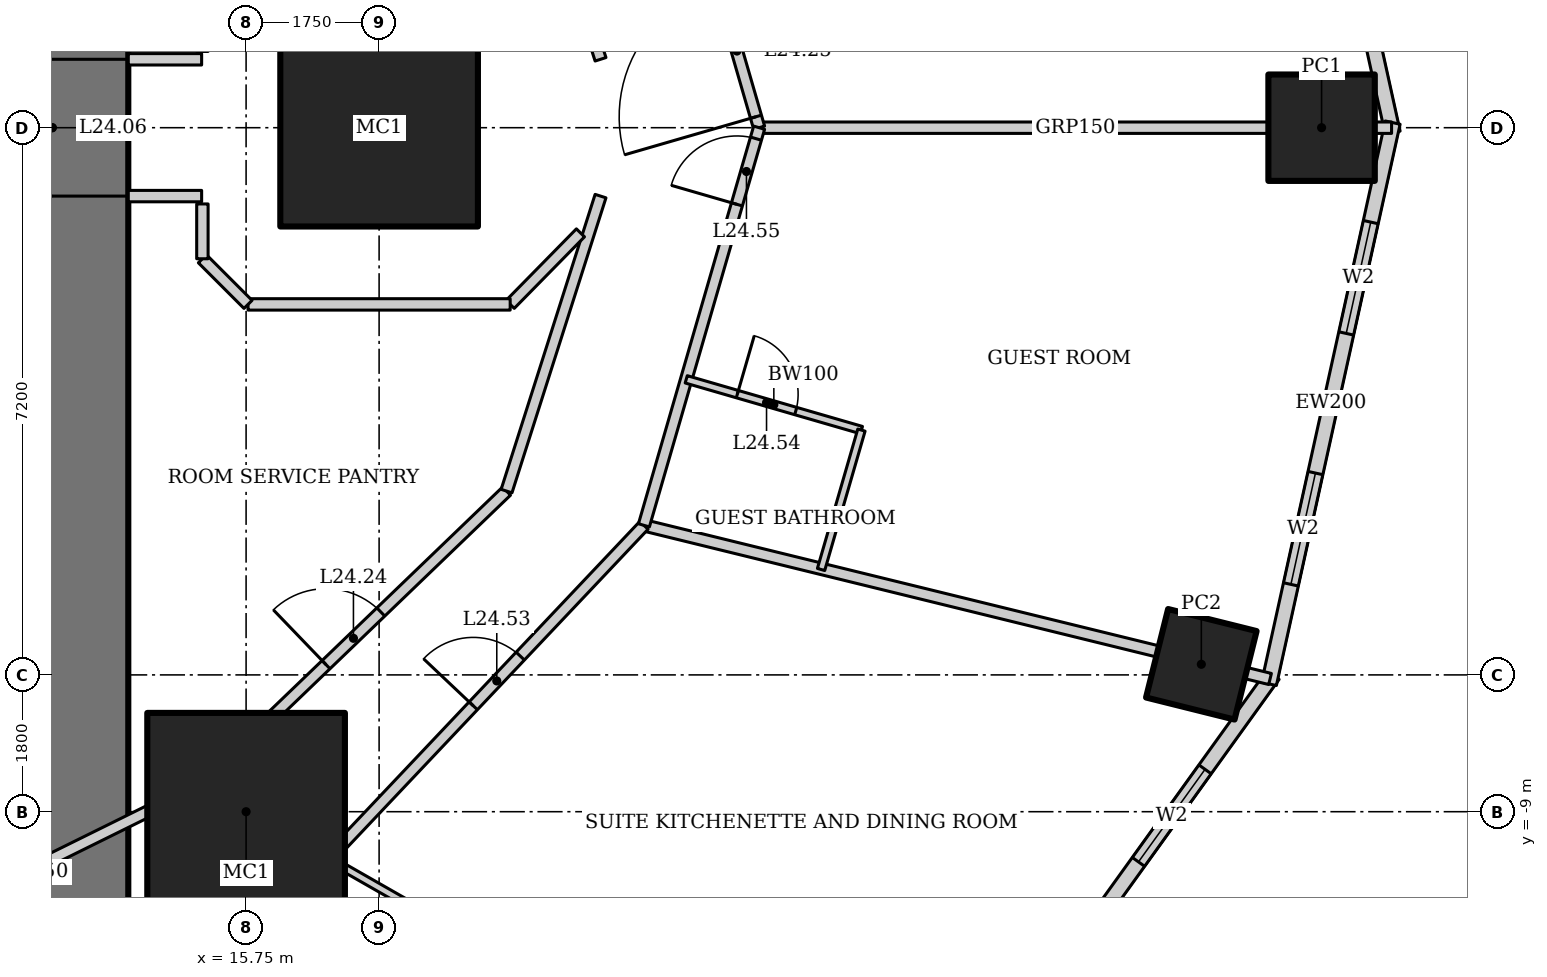
"""IFC4 building model, lengths in metres.
Left out: names, types, materials, properties, quantities, classifications, styles, units other than length and angle.
Written with IfcOpenShell. Run it as: python <this file> out.ifc"""

import sys

from ifc_helpers import new_model, si_unit, direction, frame, frame_2d, origin, origin_2d, place, context, subcontext, project, spatial, rectangle, hollow_rectangle, extrude, element, fill, save


model = new_model("IFC4")
c1 = context("Model", 3, precision=1e-05, world=origin(), true_north=direction((0.0, 1.0)))
c2 = subcontext(c1, "Body", "Model", "MODEL_VIEW")
j1 = project(units=[si_unit("LENGTHUNIT", "METRE"), si_unit("PLANEANGLEUNIT", "RADIAN")], contexts=[c1])
p1 = place(None, origin())
s1 = spatial("IfcSite", under=j1, at=p1, CompositionType="ELEMENT")
p2 = place(p1, origin())
s2 = spatial("IfcBuilding", under=s1, at=p2, CompositionType="ELEMENT")
p3 = place(p2, frame((0.0, 0.0, 101.8)))
s3 = spatial("IfcBuildingStorey", under=s2, at=p3, CompositionType="ELEMENT", Elevation=101.8)
for number, where, z_axis, x_axis in (
    (1, (17.5, 0.0, 0.0), (0.0, 0.0, 1.0), (1.0, 0.0, 0.0)),
    (2, (15.75, -9.0, 0.0), (0.0, 0.0, 1.0), (1.0, 0.0, 0.0)),
):
    element("IfcColumn", number, at=place(p3, frame(where, z_axis=z_axis, x_axis=x_axis)), inside=s3, PredefinedType="COLUMN", context=c2, shape_type="SweptSolid", body=[
        extrude(hollow_rectangle(XDim=2.6, YDim=2.6, WallThickness=0.13, at=origin_2d()), origin(), (0.0, 0.0, 1.0), 3.6),
    ])
p4 = place(p3, frame((29.9, 0.0, 0.0), z_axis=(0.0, 0.0, 1.0), x_axis=(1.0, 0.0, 0.0)))
e3 = element("IfcColumn", 3, at=p4, inside=s3, PredefinedType="COLUMN", context=c2, shape_type="SweptSolid", body=[
    extrude(hollow_rectangle(XDim=1.4, YDim=1.4, WallThickness=0.1, at=origin_2d()), origin(), (0.0, 0.0, 1.0), 2.06),
])
p5 = place(p3, frame((28.318, -7.06, 0.0), z_axis=(0.0, 0.0, 1.0), x_axis=(0.2419218956, 0.970295726276, 0.0)))
e4 = element("IfcColumn", 4, at=p5, inside=s3, PredefinedType="COLUMN", context=c2, shape_type="SweptSolid", body=[
    extrude(hollow_rectangle(XDim=1.2, YDim=1.2, WallThickness=0.1, at=origin_2d()), origin(), (0.0, 0.0, 1.0), 2.28),
])
p6 = place(p3, frame((13.2, -13.0, 0.0), z_axis=(0.0, 0.0, 1.0), x_axis=(0.0, 1.0, 0.0)))
e5 = element("IfcWall", 5, at=p6, inside=s3, PredefinedType="SHEAR", context=c2, shape_type="SweptSolid", body=[
    extrude(rectangle(XDim=26.0, YDim=2.0, at=frame_2d((13.0, 0.0))), origin(), (0.0, 0.0, 1.0), 3.6),
])
p7 = place(p6, frame((12.1, 0.0, 0.0)))
e6 = element("IfcOpeningElement", 6, at=p7, cuts=e5, PredefinedType="OPENING", context=c2, shape_type="SweptSolid", body=[
    extrude(rectangle(XDim=1.8, YDim=2.1, at=frame_2d((0.9, 1.05))), frame((0.0, 1.01, 0.0), z_axis=(0.0, -1.0, 0.0), x_axis=(1.0, 0.0, 0.0)), (0.0, 0.0, 1.0), 2.02),
])
p8 = place(p3, frame((30.835, -0.067, 0.0), z_axis=(0.0, 0.0, 1.0), x_axis=(-0.215238065514, 0.976561608478, 0.0)))
e7 = element("IfcWall", 7, at=p8, inside=s3, PredefinedType="SOLIDWALL", context=c2, shape_type="SweptSolid", body=[
    extrude(rectangle(XDim=7.562, YDim=0.2, at=frame_2d((3.781, 0.0))), origin(), (0.0, 0.0, 1.0), 3.4),
])
p9 = place(p8, frame((1.341, 0.0, 0.5)))
e8 = element("IfcOpeningElement", 8, at=p9, cuts=e7, PredefinedType="OPENING", context=c2, shape_type="SweptSolid", body=[
    extrude(rectangle(XDim=1.5, YDim=2.2, at=frame_2d((0.75, 1.1))), frame((0.0, 0.11, 0.0), z_axis=(0.0, -1.0, 0.0), x_axis=(1.0, 0.0, 0.0)), (0.0, 0.0, 1.0), 0.22),
])
p10 = place(p8, frame((4.722, 0.0, 0.5)))
e9 = element("IfcOpeningElement", 9, at=p10, cuts=e7, PredefinedType="OPENING", context=c2, shape_type="SweptSolid", body=[
    extrude(rectangle(XDim=1.5, YDim=2.2, at=frame_2d((0.75, 1.1))), frame((0.0, 0.11, 0.0), z_axis=(0.0, -1.0, 0.0), x_axis=(1.0, 0.0, 0.0)), (0.0, 0.0, 1.0), 0.22),
])
p11 = place(p3, frame((24.4, -13.957, 0.0), z_axis=(0.0, 0.0, 1.0), x_axis=(0.583937613703, 0.811798536155, 0.0)))
e10 = element("IfcWall", 10, at=p11, inside=s3, PredefinedType="SOLIDWALL", context=c2, shape_type="SweptSolid", body=[
    extrude(rectangle(XDim=8.323, YDim=0.2, at=frame_2d((4.162, 0.0))), origin(), (0.0, 0.0, 1.0), 3.4),
])
p12 = place(p11, frame((1.531, 0.0, 0.5)))
e11 = element("IfcOpeningElement", 11, at=p12, cuts=e10, PredefinedType="OPENING", context=c2, shape_type="SweptSolid", body=[
    extrude(rectangle(XDim=1.5, YDim=2.2, at=frame_2d((0.75, 1.1))), frame((0.0, 0.11, 0.0), z_axis=(0.0, -1.0, 0.0), x_axis=(1.0, 0.0, 0.0)), (0.0, 0.0, 1.0), 0.22),
])
p13 = place(p11, frame((5.292, 0.0, 0.5)))
e12 = element("IfcOpeningElement", 12, at=p13, cuts=e10, PredefinedType="OPENING", context=c2, shape_type="SweptSolid", body=[
    extrude(rectangle(XDim=1.5, YDim=2.2, at=frame_2d((0.75, 1.1))), frame((0.0, 0.11, 0.0), z_axis=(0.0, -1.0, 0.0), x_axis=(1.0, 0.0, 0.0)), (0.0, 0.0, 1.0), 0.22),
])
p14 = place(p3, frame((29.208, -7.318, 0.0), z_axis=(0.0, 0.0, 1.0), x_axis=(0.215238065514, 0.976561608478, 0.0)))
e13 = element("IfcWall", 13, at=p14, inside=s3, PredefinedType="SOLIDWALL", context=c2, shape_type="SweptSolid", body=[
    extrude(rectangle(XDim=7.562, YDim=0.2, at=frame_2d((3.781, 0.0))), origin(), (0.0, 0.0, 1.0), 3.4),
])
p15 = place(p14, frame((1.341, 0.0, 0.5)))
e14 = element("IfcOpeningElement", 14, at=p15, cuts=e13, PredefinedType="OPENING", context=c2, shape_type="SweptSolid", body=[
    extrude(rectangle(XDim=1.5, YDim=2.2, at=frame_2d((0.75, 1.1))), frame((0.0, 0.11, 0.0), z_axis=(0.0, -1.0, 0.0), x_axis=(1.0, 0.0, 0.0)), (0.0, 0.0, 1.0), 0.22),
])
p16 = place(p14, frame((4.722, 0.0, 0.5)))
e15 = element("IfcOpeningElement", 15, at=p16, cuts=e13, PredefinedType="OPENING", context=c2, shape_type="SweptSolid", body=[
    extrude(rectangle(XDim=1.5, YDim=2.2, at=frame_2d((0.75, 1.1))), frame((0.0, 0.11, 0.0), z_axis=(0.0, -1.0, 0.0), x_axis=(1.0, 0.0, 0.0)), (0.0, 0.0, 1.0), 0.22),
])
p17 = place(p3, frame((30.821, 0.0, 0.0), z_axis=(0.0, 0.0, 1.0), x_axis=(-1.0, 0.0, 0.0)))
e16 = element("IfcWall", 16, at=p17, inside=s3, PredefinedType="PARTITIONING", context=c2, shape_type="SweptSolid", body=[
    extrude(rectangle(XDim=8.321, YDim=0.15, at=frame_2d((4.16, 0.0))), origin(), (0.0, 0.0, 1.0), 2.2),
])
p18 = place(p3, frame((29.222, -7.254, 0.0), z_axis=(0.0, 0.0, 1.0), x_axis=(-0.971178166182, 0.238354713676, 0.0)))
e17 = element("IfcWall", 17, at=p18, inside=s3, PredefinedType="PARTITIONING", context=c2, shape_type="SweptSolid", body=[
    extrude(rectangle(XDim=8.482, YDim=0.15, at=frame_2d((4.241, 0.0))), origin(), (0.0, 0.0, 1.0), 1.9),
])
p19 = place(p3, frame((22.5, 0.0, 0.0), z_axis=(0.0, 0.0, 1.0), x_axis=(-0.278247435376, 0.960509429785, 0.0)))
e18 = element("IfcWall", 18, at=p19, inside=s3, PredefinedType="PARTITIONING", context=c2, shape_type="SweptSolid", body=[
    extrude(rectangle(XDim=5.447, YDim=0.15, at=frame_2d((2.724, 0.0))), origin(), (0.0, 0.0, 1.0), 3.4),
])
p20 = place(p19, frame((0.15, 0.0, 0.0)))
e19 = element("IfcOpeningElement", 19, at=p20, cuts=e18, PredefinedType="OPENING", context=c2, shape_type="SweptSolid", body=[
    extrude(rectangle(XDim=1.8, YDim=2.1, at=frame_2d((0.9, 1.05))), frame((0.0, 0.085, 0.0), z_axis=(0.0, -1.0, 0.0), x_axis=(1.0, 0.0, 0.0)), (0.0, 0.0, 1.0), 0.17),
])
p21 = place(p3, frame((11.888, -12.311, 0.0), z_axis=(0.0, 0.0, 1.0), x_axis=(0.878450059298, 0.477834169267, 0.0)))
e20 = element("IfcWall", 20, at=p21, inside=s3, PredefinedType="PARTITIONING", context=c2, shape_type="SweptSolid", body=[
    extrude(rectangle(XDim=5.631, YDim=0.15, at=frame_2d((2.815, 0.0))), origin(), (0.0, 0.0, 1.0), 3.4),
])
p22 = place(p3, frame((16.835, -9.62, 0.0), z_axis=(0.0, 0.0, 1.0), x_axis=(0.687062608696, 0.726598218916, 0.0)))
e21 = element("IfcWall", 21, at=p22, inside=s3, PredefinedType="PARTITIONING", context=c2, shape_type="SweptSolid", body=[
    extrude(rectangle(XDim=6.039, YDim=0.15, at=frame_2d((3.02, 0.0))), origin(), (0.0, 0.0, 1.0), 3.4),
])
p23 = place(p22, frame((2.771, 0.0, 0.0)))
e22 = element("IfcOpeningElement", 22, at=p23, cuts=e21, PredefinedType="OPENING", context=c2, shape_type="SweptSolid", body=[
    extrude(rectangle(XDim=0.9, YDim=2.1, at=frame_2d((0.45, 1.05))), frame((0.0, 0.085, 0.0), z_axis=(0.0, -1.0, 0.0), x_axis=(1.0, 0.0, 0.0)), (0.0, 0.0, 1.0), 0.17),
])
p24 = place(p3, frame((20.984, -5.232, 0.0), z_axis=(0.0, 0.0, 1.0), x_axis=(0.278247435376, 0.960509429785, 0.0)))
e23 = element("IfcWall", 23, at=p24, inside=s3, PredefinedType="PARTITIONING", context=c2, shape_type="SweptSolid", body=[
    extrude(rectangle(XDim=5.447, YDim=0.15, at=frame_2d((2.724, 0.0))), origin(), (0.0, 0.0, 1.0), 3.4),
])
p25 = place(p24, frame((4.397, 0.0, 0.0)))
e24 = element("IfcOpeningElement", 24, at=p25, cuts=e23, PredefinedType="OPENING", context=c2, shape_type="SweptSolid", body=[
    extrude(rectangle(XDim=0.9, YDim=2.1, at=frame_2d((0.45, 1.05))), frame((0.0, 0.085, 0.0), z_axis=(0.0, -1.0, 0.0), x_axis=(1.0, 0.0, 0.0)), (0.0, 0.0, 1.0), 0.17),
])
p26 = place(p3, frame((20.413, 0.9, 0.0), z_axis=(0.0, 0.0, 1.0), x_axis=(-0.303505448228, 0.952829702988, 0.0)))
e25 = element("IfcWall", 25, at=p26, inside=s3, PredefinedType="PARTITIONING", context=c2, shape_type="SweptSolid", body=[
    extrude(rectangle(XDim=4.073, YDim=0.15, at=frame_2d((2.037, 0.0))), origin(), (0.0, 0.0, 1.0), 3.4),
])
p27 = place(p3, frame((10.551, -10.926, 0.0), z_axis=(0.0, 0.0, 1.0), x_axis=(0.89656943448, 0.442903205177, 0.0)))
e26 = element("IfcWall", 26, at=p27, inside=s3, PredefinedType="PARTITIONING", context=c2, shape_type="SweptSolid", body=[
    extrude(rectangle(XDim=5.126, YDim=0.15, at=frame_2d((2.563, 0.0))), origin(), (0.0, 0.0, 1.0), 3.4),
])
p28 = place(p3, frame((15.147, -8.656, 0.0), z_axis=(0.0, 0.0, 1.0), x_axis=(0.720837261072, 0.693104352209, 0.0)))
e27 = element("IfcWall", 27, at=p28, inside=s3, PredefinedType="PARTITIONING", context=c2, shape_type="SweptSolid", body=[
    extrude(rectangle(XDim=5.59, YDim=0.15, at=frame_2d((2.795, 0.0))), origin(), (0.0, 0.0, 1.0), 3.4),
])
p29 = place(p28, frame((2.295, 0.0, 0.0)))
e28 = element("IfcOpeningElement", 28, at=p29, cuts=e27, PredefinedType="OPENING", context=c2, shape_type="SweptSolid", body=[
    extrude(rectangle(XDim=1.0, YDim=2.1, at=frame_2d((0.5, 1.05))), frame((0.0, 0.085, 0.0), z_axis=(0.0, -1.0, 0.0), x_axis=(1.0, 0.0, 0.0)), (0.0, 0.0, 1.0), 0.17),
])
p30 = place(p3, frame((19.177, -4.781, 0.0), z_axis=(0.0, 0.0, 1.0), x_axis=(0.303505448228, 0.952829702988, 0.0)))
e29 = element("IfcWall", 29, at=p30, inside=s3, PredefinedType="PARTITIONING", context=c2, shape_type="SweptSolid", body=[
    extrude(rectangle(XDim=4.073, YDim=0.15, at=frame_2d((2.037, 0.0))), origin(), (0.0, 0.0, 1.0), 3.4),
])
p31 = place(p3, frame((23.171, -13.24, 0.0), z_axis=(0.0, 0.0, 1.0), x_axis=(-0.868253436131, 0.496120923412, 0.0)))
e30 = element("IfcWall", 30, at=p31, inside=s3, PredefinedType="PARTITIONING", context=c2, shape_type="SweptSolid", body=[
    extrude(rectangle(XDim=7.297, YDim=0.1, at=frame_2d((3.649, 0.0))), origin(), (0.0, 0.0, 1.0), 2.2),
])
p32 = place(p31, frame((3.198, 0.0, 0.0)))
e31 = element("IfcOpeningElement", 31, at=p32, cuts=e30, PredefinedType="OPENING", context=c2, shape_type="SweptSolid", body=[
    extrude(rectangle(XDim=0.9, YDim=2.1, at=frame_2d((0.45, 1.05))), frame((0.0, 0.06, 0.0), z_axis=(0.0, -1.0, 0.0), x_axis=(1.0, 0.0, 0.0)), (0.0, 0.0, 1.0), 0.12),
])
p33 = place(p3, frame((21.541, -3.311, 0.0), z_axis=(0.0, 0.0, 1.0), x_axis=(0.960515628303, -0.278226037218, 0.0)))
e32 = element("IfcWall", 32, at=p33, inside=s3, PredefinedType="PARTITIONING", context=c2, shape_type="SweptSolid", body=[
    extrude(rectangle(XDim=2.4, YDim=0.1, at=frame_2d((1.2, 0.0))), origin(), (0.0, 0.0, 1.0), 3.4),
])
p34 = place(p33, frame((0.7, 0.0, 0.0)))
e33 = element("IfcOpeningElement", 33, at=p34, cuts=e32, PredefinedType="OPENING", context=c2, shape_type="SweptSolid", body=[
    extrude(rectangle(XDim=0.8, YDim=2.1, at=frame_2d((0.4, 1.05))), frame((0.0, 0.06, 0.0), z_axis=(0.0, -1.0, 0.0), x_axis=(1.0, 0.0, 0.0)), (0.0, 0.0, 1.0), 0.12),
])
p35 = place(p3, frame((23.846, -3.979, 0.0), z_axis=(0.0, 0.0, 1.0), x_axis=(-0.278197767203, -0.960523816635, 0.0)))
e34 = element("IfcWall", 34, at=p35, inside=s3, PredefinedType="PARTITIONING", context=c2, shape_type="SweptSolid", body=[
    extrude(rectangle(XDim=1.91, YDim=0.1, at=frame_2d((0.955, 0.0))), origin(), (0.0, 0.0, 1.0), 3.4),
])
for number, where, z_axis, x_axis in (
    (35, (14.2, -0.9, 0.0), (0.0, 0.0, 1.0), (1.0, 0.0, 0.0)),
    (36, (14.2, 0.9, 0.0), (0.0, 0.0, 1.0), (1.0, 0.0, 0.0)),
):
    element("IfcWall", number, at=place(p3, frame(where, z_axis=z_axis, x_axis=x_axis)), inside=s3, PredefinedType="PARTITIONING", context=c2, shape_type="SweptSolid", body=[
        extrude(rectangle(XDim=0.965, YDim=0.15, at=frame_2d((0.482, 0.0))), origin(), (0.0, 0.0, 1.0), 3.4),
    ])
p36 = place(p3, frame((20.149, -1.384, 0.0), z_axis=(0.0, 0.0, 1.0), x_axis=(-0.700694560486, -0.713461374501, 0.0)))
e37 = element("IfcWall", 37, at=p36, inside=s3, PredefinedType="PARTITIONING", context=c2, shape_type="SweptSolid", body=[
    extrude(rectangle(XDim=1.32, YDim=0.15, at=frame_2d((0.66, 0.0))), origin(), (0.0, 0.0, 1.0), 3.4),
])
p37 = place(p3, frame((19.225, -2.325, 0.0), z_axis=(0.0, 0.0, 1.0), x_axis=(-1.0, 0.0, 0.0)))
e38 = element("IfcWall", 38, at=p37, inside=s3, PredefinedType="PARTITIONING", context=c2, shape_type="SweptSolid", body=[
    extrude(rectangle(XDim=3.449, YDim=0.15, at=frame_2d((1.725, 0.0))), origin(), (0.0, 0.0, 1.0), 3.4),
])
p38 = place(p3, frame((15.775, -2.325, 0.0), z_axis=(0.0, 0.0, 1.0), x_axis=(-0.707106781187, 0.707106781187, 0.0)))
e39 = element("IfcWall", 39, at=p38, inside=s3, PredefinedType="PARTITIONING", context=c2, shape_type="SweptSolid", body=[
    extrude(rectangle(XDim=0.849, YDim=0.15, at=frame_2d((0.425, 0.0))), origin(), (0.0, 0.0, 1.0), 3.4),
])
p39 = place(p3, frame((15.175, -1.725, 0.0), z_axis=(0.0, 0.0, 1.0), x_axis=(0.0, 1.0, 0.0)))
e40 = element("IfcWall", 40, at=p39, inside=s3, PredefinedType="PARTITIONING", context=c2, shape_type="SweptSolid", body=[
    extrude(rectangle(XDim=0.721, YDim=0.15, at=frame_2d((0.361, 0.0))), origin(), (0.0, 0.0, 1.0), 3.4),
])
p40 = place(p13, origin())
e41 = element("IfcWindow", 41, at=p40, inside=s3, PartitioningType="SINGLE_PANEL", PredefinedType="WINDOW", context=c2, shape_type="SweptSolid", body=[
    extrude(rectangle(XDim=1.5, YDim=2.2, at=frame_2d((0.75, 1.1))), frame((0.0, 0.03, 0.0), z_axis=(0.0, -1.0, 0.0), x_axis=(1.0, 0.0, 0.0)), (0.0, 0.0, 1.0), 0.06),
])
fill(e12, e41)
p41 = place(p15, origin())
e42 = element("IfcWindow", 42, at=p41, inside=s3, PartitioningType="SINGLE_PANEL", PredefinedType="WINDOW", context=c2, shape_type="SweptSolid", body=[
    extrude(rectangle(XDim=1.5, YDim=2.2, at=frame_2d((0.75, 1.1))), frame((0.0, 0.03, 0.0), z_axis=(0.0, -1.0, 0.0), x_axis=(1.0, 0.0, 0.0)), (0.0, 0.0, 1.0), 0.06),
])
fill(e14, e42)
p42 = place(p16, origin())
e43 = element("IfcWindow", 43, at=p42, inside=s3, PartitioningType="SINGLE_PANEL", PredefinedType="WINDOW", context=c2, shape_type="SweptSolid", body=[
    extrude(rectangle(XDim=1.5, YDim=2.2, at=frame_2d((0.75, 1.1))), frame((0.0, 0.03, 0.0), z_axis=(0.0, -1.0, 0.0), x_axis=(1.0, 0.0, 0.0)), (0.0, 0.0, 1.0), 0.06),
])
fill(e15, e43)
p43 = place(p7, origin())
e44 = element("IfcDoor", 44, at=p43, inside=s3, OperationType="DOUBLE_DOOR_DOUBLE_SWING", PredefinedType="DOOR", context=c2, shape_type="SweptSolid", body=[
    extrude(rectangle(XDim=1.8, YDim=2.1, at=frame_2d((0.9, 1.05))), frame((0.0, 0.025, 0.0), z_axis=(0.0, -1.0, 0.0), x_axis=(1.0, 0.0, 0.0)), (0.0, 0.0, 1.0), 0.05),
])
fill(e6, e44)
p44 = place(p29, origin())
e45 = element("IfcDoor", 45, at=p44, inside=s3, OperationType="SINGLE_SWING_LEFT", PredefinedType="DOOR", context=c2, shape_type="SweptSolid", body=[
    extrude(rectangle(XDim=1.0, YDim=2.1, at=frame_2d((0.5, 1.05))), frame((0.0, 0.025, 0.0), z_axis=(0.0, -1.0, 0.0), x_axis=(1.0, 0.0, 0.0)), (0.0, 0.0, 1.0), 0.05),
])
fill(e28, e45)
p45 = place(p20, origin())
e46 = element("IfcDoor", 46, at=p45, inside=s3, OperationType="DOUBLE_DOOR_DOUBLE_SWING", PredefinedType="DOOR", context=c2, shape_type="SweptSolid", body=[
    extrude(rectangle(XDim=1.8, YDim=2.1, at=frame_2d((0.9, 1.05))), frame((0.0, 0.025, 0.0), z_axis=(0.0, -1.0, 0.0), x_axis=(1.0, 0.0, 0.0)), (0.0, 0.0, 1.0), 0.05),
])
fill(e19, e46)
p46 = place(p23, origin())
e47 = element("IfcDoor", 47, at=p46, inside=s3, OperationType="SINGLE_SWING_LEFT", PredefinedType="DOOR", context=c2, shape_type="SweptSolid", body=[
    extrude(rectangle(XDim=0.9, YDim=2.1, at=frame_2d((0.45, 1.05))), frame((0.0, 0.025, 0.0), z_axis=(0.0, -1.0, 0.0), x_axis=(1.0, 0.0, 0.0)), (0.0, 0.0, 1.0), 0.05),
])
fill(e22, e47)
p47 = place(p34, origin())
e48 = element("IfcDoor", 48, at=p47, inside=s3, OperationType="SINGLE_SWING_LEFT", PredefinedType="DOOR", context=c2, shape_type="SweptSolid", body=[
    extrude(rectangle(XDim=0.8, YDim=2.1, at=frame_2d((0.4, 1.05))), frame((0.0, 0.025, 0.0), z_axis=(0.0, -1.0, 0.0), x_axis=(1.0, 0.0, 0.0)), (0.0, 0.0, 1.0), 0.05),
])
fill(e33, e48)
p48 = place(p25, origin())
e49 = element("IfcDoor", 49, at=p48, inside=s3, OperationType="SINGLE_SWING_LEFT", PredefinedType="DOOR", context=c2, shape_type="SweptSolid", body=[
    extrude(rectangle(XDim=0.9, YDim=2.1, at=frame_2d((0.45, 1.05))), frame((0.0, 0.025, 0.0), z_axis=(0.0, -1.0, 0.0), x_axis=(1.0, 0.0, 0.0)), (0.0, 0.0, 1.0), 0.05),
])
fill(e24, e49)
save(model, sys.argv[1])
